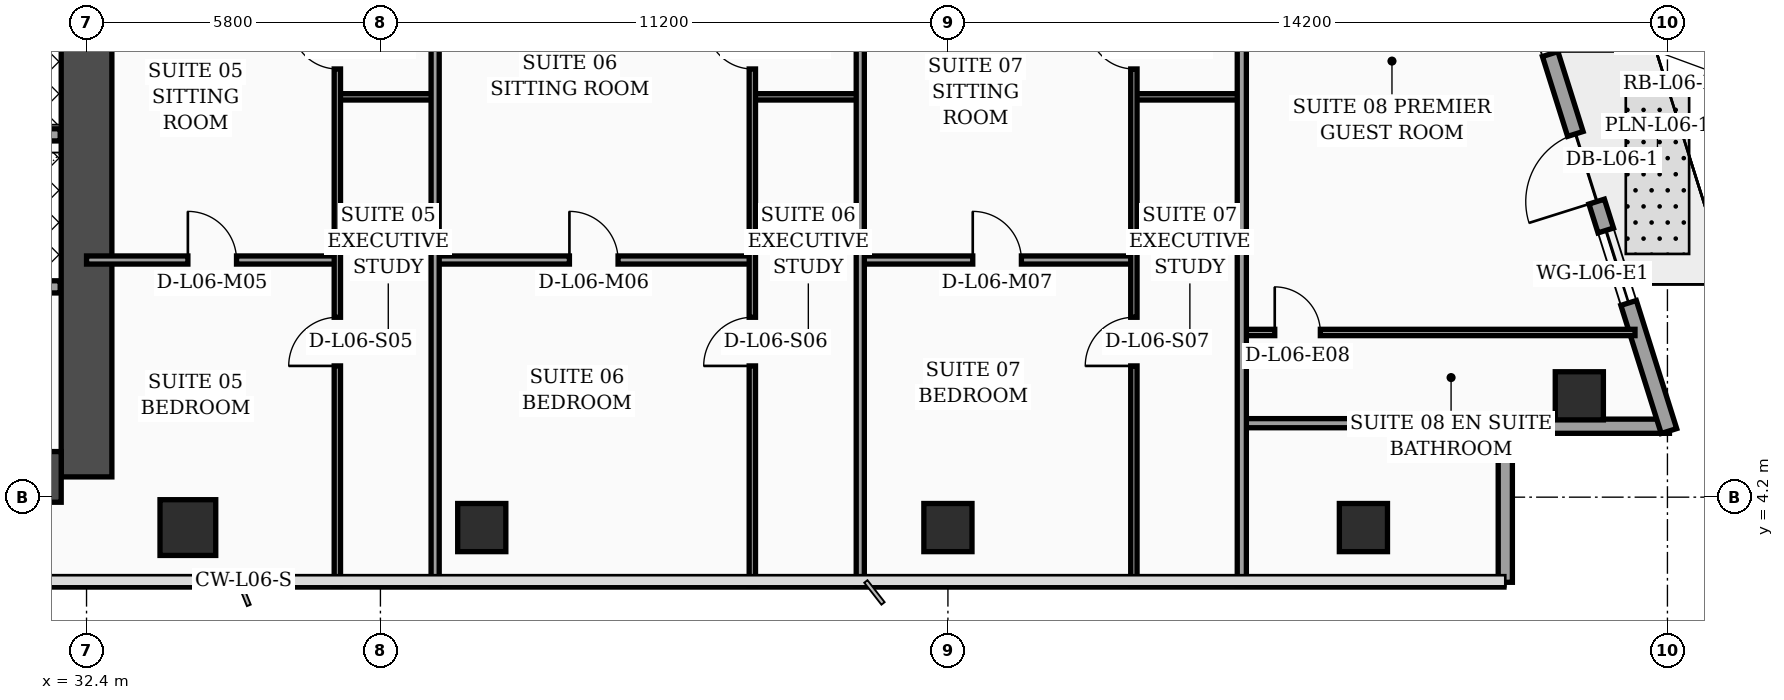
"""IFC4 building model, lengths in metres.
Left out: names, types, materials, properties, quantities, classifications, styles, units other than length and angle.
Written with IfcOpenShell. Run it as: python <this file> out.ifc"""

import sys

from ifc_helpers import new_model, si_unit, direction, frame, frame_2d, origin, origin_2d, place, context, subcontext, project, spatial, rectangle, hollow_rectangle, extrude, element, fill, save


model = new_model("IFC4")
c1 = context("Model", 3, precision=1e-05, world=origin(), true_north=direction((0.0, 1.0)))
c2 = subcontext(c1, "Body", "Model", "MODEL_VIEW")
j1 = project(units=[si_unit("LENGTHUNIT", "METRE"), si_unit("PLANEANGLEUNIT", "RADIAN")], contexts=[c1])
p1 = place(None, origin())
s1 = spatial("IfcSite", under=j1, at=p1, CompositionType="ELEMENT")
p2 = place(p1, origin())
s2 = spatial("IfcBuilding", under=s1, at=p2, CompositionType="ELEMENT")
p3 = place(p2, frame((0.0, 0.0, 30.8)))
s3 = spatial("IfcBuildingStorey", under=s2, at=p3, CompositionType="ELEMENT", Elevation=30.8)
p4 = place(p3, frame((32.4, 4.6, 0.0), z_axis=(0.0, 0.0, 1.0), x_axis=(0.0, 1.0, 0.0)))
e1 = element("IfcWall", 1, at=p4, inside=s3, PredefinedType="SHEAR", context=c2, shape_type="SweptSolid", body=[
    extrude(rectangle(XDim=10.4, YDim=1.0, at=frame_2d((5.2, 0.0))), origin(), (0.0, 0.0, 1.0), 3.56),
])
p5 = place(p3, frame((22.1, 4.6, 0.0), z_axis=(0.0, 0.0, 1.0), x_axis=(1.0, 0.0, 0.0)))
e2 = element("IfcWall", 2, at=p5, inside=s3, PredefinedType="SHEAR", context=c2, shape_type="SweptSolid", body=[
    extrude(rectangle(XDim=9.8, YDim=1.0, at=frame_2d((4.9, 0.0))), origin(), (0.0, 0.0, 1.0), 3.56),
])
p6 = place(p3, frame((34.4, 3.6, 0.0), z_axis=(0.0, 0.0, 1.0), x_axis=(1.0, 0.0, 0.0)))
e3 = element("IfcColumn", 3, at=p6, inside=s3, PredefinedType="COLUMN", context=c2, shape_type="SweptSolid", body=[
    extrude(hollow_rectangle(XDim=1.1, YDim=1.1, WallThickness=0.045, at=origin_2d()), origin(), (0.0, 0.0, 1.0), 3.56),
])
for number, where, z_axis, x_axis in (
    (4, (40.2, 3.6, 0.0), (0.0, 0.0, 1.0), (1.0, 0.0, 0.0)),
    (5, (49.4, 3.6, 0.0), (0.0, 0.0, 1.0), (1.0, 0.0, 0.0)),
    (6, (57.6, 3.6, 0.0), (0.0, 0.0, 1.0), (1.0, 0.0, 0.0)),
    (7, (61.861, 6.2, 0.0), (0.0, 0.0, 1.0), (1.0, 0.0, 0.0)),
):
    element("IfcColumn", number, at=place(p3, frame(where, z_axis=z_axis, x_axis=x_axis)), inside=s3, PredefinedType="COLUMN", context=c2, shape_type="SweptSolid", body=[
        extrude(hollow_rectangle(XDim=0.95, YDim=0.95, WallThickness=0.04, at=origin_2d()), origin(), (0.0, 0.0, 1.0), 3.56),
    ])
p7 = place(p3, frame((60.4, 2.52, 0.0), z_axis=(0.0, 0.0, 1.0), x_axis=(0.0, 1.0, 0.0)))
e8 = element("IfcWall", 8, at=p7, inside=s3, PredefinedType="SOLIDWALL", context=c2, shape_type="SweptSolid", body=[
    extrude(rectangle(XDim=2.94, YDim=0.28, at=frame_2d((1.47, 0.0))), origin(), (0.0, 0.0, 1.0), 3.04),
])
p8 = place(p3, frame((60.26, 5.6, 0.0), z_axis=(0.0, 0.0, 1.0), x_axis=(1.0, 0.0, 0.0)))
e9 = element("IfcWall", 9, at=p8, inside=s3, PredefinedType="SOLIDWALL", context=c2, shape_type="SweptSolid", body=[
    extrude(rectangle(XDim=3.38, YDim=0.28, at=frame_2d((1.69, 0.0))), origin(), (0.0, 0.0, 1.0), 3.04),
])
p9 = place(p3, frame((63.63, 5.505, 0.0), z_axis=(0.0, 0.0, 1.0), x_axis=(-0.300501856448, 0.953781229775, 0.0)))
e10 = element("IfcWall", 10, at=p9, inside=s3, PredefinedType="SOLIDWALL", context=c2, shape_type="SweptSolid", body=[
    extrude(rectangle(XDim=30.814, YDim=0.32, at=frame_2d((15.407, 0.0))), origin(), (0.0, 0.0, 1.0), 3.56),
])
p10 = place(p9, frame((4.747, 0.0, 0.0)))
e11 = element("IfcOpeningElement", 11, at=p10, cuts=e10, PredefinedType="OPENING", context=c2, shape_type="SweptSolid", body=[
    extrude(rectangle(XDim=1.4, YDim=2.25, at=frame_2d((0.7, 1.125))), frame((0.0, 0.17, 0.0), z_axis=(0.0, -1.0, 0.0), x_axis=(1.0, 0.0, 0.0)), (0.0, 0.0, 1.0), 0.34),
])
p11 = place(p9, frame((2.65, 0.0, 0.75)))
e12 = element("IfcOpeningElement", 12, at=p11, cuts=e10, PredefinedType="OPENING", context=c2, shape_type="SweptSolid", body=[
    extrude(rectangle(XDim=1.5, YDim=1.6, at=frame_2d((0.75, 0.8))), frame((0.0, 0.17, 0.0), z_axis=(0.0, -1.0, 0.0), x_axis=(1.0, 0.0, 0.0)), (0.0, 0.0, 1.0), 0.34),
])
p12 = place(p9, frame((7.8, 0.0, 0.75)))
e13 = element("IfcOpeningElement", 13, at=p12, cuts=e10, PredefinedType="OPENING", context=c2, shape_type="SweptSolid", body=[
    extrude(rectangle(XDim=1.5, YDim=1.6, at=frame_2d((0.75, 0.8))), frame((0.0, 0.17, 0.0), z_axis=(0.0, -1.0, 0.0), x_axis=(1.0, 0.0, 0.0)), (0.0, 0.0, 1.0), 0.34),
])
p13 = place(p9, frame((10.9, 0.0, 0.75)))
e14 = element("IfcOpeningElement", 14, at=p13, cuts=e10, PredefinedType="OPENING", context=c2, shape_type="SweptSolid", body=[
    extrude(rectangle(XDim=1.5, YDim=1.6, at=frame_2d((0.75, 0.8))), frame((0.0, 0.17, 0.0), z_axis=(0.0, -1.0, 0.0), x_axis=(1.0, 0.0, 0.0)), (0.0, 0.0, 1.0), 0.34),
])
p14 = place(p9, frame((14.0, 0.0, 0.75)))
e15 = element("IfcOpeningElement", 15, at=p14, cuts=e10, PredefinedType="OPENING", context=c2, shape_type="SweptSolid", body=[
    extrude(rectangle(XDim=1.5, YDim=1.6, at=frame_2d((0.75, 0.8))), frame((0.0, 0.17, 0.0), z_axis=(0.0, -1.0, 0.0), x_axis=(1.0, 0.0, 0.0)), (0.0, 0.0, 1.0), 0.34),
])
p15 = place(p9, frame((17.1, 0.0, 0.75)))
e16 = element("IfcOpeningElement", 16, at=p15, cuts=e10, PredefinedType="OPENING", context=c2, shape_type="SweptSolid", body=[
    extrude(rectangle(XDim=1.5, YDim=1.6, at=frame_2d((0.75, 0.8))), frame((0.0, 0.17, 0.0), z_axis=(0.0, -1.0, 0.0), x_axis=(1.0, 0.0, 0.0)), (0.0, 0.0, 1.0), 0.34),
])
p16 = place(p9, frame((20.2, 0.0, 0.75)))
e17 = element("IfcOpeningElement", 17, at=p16, cuts=e10, PredefinedType="OPENING", context=c2, shape_type="SweptSolid", body=[
    extrude(rectangle(XDim=1.5, YDim=1.6, at=frame_2d((0.75, 0.8))), frame((0.0, 0.17, 0.0), z_axis=(0.0, -1.0, 0.0), x_axis=(1.0, 0.0, 0.0)), (0.0, 0.0, 1.0), 0.34),
])
p17 = place(p9, frame((23.3, 0.0, 0.75)))
e18 = element("IfcOpeningElement", 18, at=p17, cuts=e10, PredefinedType="OPENING", context=c2, shape_type="SweptSolid", body=[
    extrude(rectangle(XDim=1.5, YDim=1.6, at=frame_2d((0.75, 0.8))), frame((0.0, 0.17, 0.0), z_axis=(0.0, -1.0, 0.0), x_axis=(1.0, 0.0, 0.0)), (0.0, 0.0, 1.0), 0.34),
])
p18 = place(p9, frame((26.4, 0.0, 0.75)))
e19 = element("IfcOpeningElement", 19, at=p18, cuts=e10, PredefinedType="OPENING", context=c2, shape_type="SweptSolid", body=[
    extrude(rectangle(XDim=1.5, YDim=1.6, at=frame_2d((0.75, 0.8))), frame((0.0, 0.17, 0.0), z_axis=(0.0, -1.0, 0.0), x_axis=(1.0, 0.0, 0.0)), (0.0, 0.0, 1.0), 0.34),
])
p19 = place(p3, frame((27.02, 11.35, 0.0), z_axis=(0.0, 0.0, 1.0), x_axis=(1.0, 0.0, 0.0)))
e20 = element("IfcWall", 20, at=p19, inside=s3, PredefinedType="SOLIDWALL", context=c2, shape_type="SweptSolid", body=[
    extrude(rectangle(XDim=4.86, YDim=0.24, at=frame_2d((2.43, 0.0))), origin(), (0.0, 0.0, 1.0), 3.56),
])
p20 = place(p19, frame((0.45, 0.0, 0.0)))
e21 = element("IfcOpeningElement", 21, at=p20, cuts=e20, PredefinedType="OPENING", context=c2, shape_type="SweptSolid", body=[
    extrude(rectangle(XDim=1.3, YDim=2.35, at=frame_2d((0.65, 1.175))), frame((0.0, 0.13, 0.0), z_axis=(0.0, -1.0, 0.0), x_axis=(1.0, 0.0, 0.0)), (0.0, 0.0, 1.0), 0.26),
])
p21 = place(p3, frame((27.02, 8.35, 0.0), z_axis=(0.0, 0.0, 1.0), x_axis=(1.0, 0.0, 0.0)))
e22 = element("IfcWall", 22, at=p21, inside=s3, PredefinedType="SOLIDWALL", context=c2, shape_type="SweptSolid", body=[
    extrude(rectangle(XDim=4.86, YDim=0.24, at=frame_2d((2.43, 0.0))), origin(), (0.0, 0.0, 1.0), 3.56),
])
p22 = place(p3, frame((37.35, 12.1, 0.0), z_axis=(0.0, 0.0, 1.0), x_axis=(1.0, 0.0, 0.0)))
e23 = element("IfcWall", 23, at=p22, inside=s3, PredefinedType="PARTITIONING", context=c2, shape_type="SweptSolid", body=[
    extrude(rectangle(XDim=1.93, YDim=0.125, at=frame_2d((0.965, 0.0))), origin(), (0.0, 0.0, 1.0), 3.56),
])
p23 = place(p3, frame((32.4, 8.88, 0.0), z_axis=(0.0, 0.0, 1.0), x_axis=(1.0, 0.0, 0.0)))
e24 = element("IfcWall", 24, at=p23, inside=s3, PredefinedType="PARTITIONING", context=c2, shape_type="SweptSolid", body=[
    extrude(rectangle(XDim=4.95, YDim=0.16, at=frame_2d((2.475, 0.0))), origin(), (0.0, 0.0, 1.0), 2.84),
])
p24 = place(p23, frame((2.0, 0.0, 0.0)))
e25 = element("IfcOpeningElement", 25, at=p24, cuts=e24, PredefinedType="OPENING", context=c2, shape_type="SweptSolid", body=[
    extrude(rectangle(XDim=0.96, YDim=2.2, at=frame_2d((0.48, 1.1))), frame((0.0, 0.09, 0.0), z_axis=(0.0, -1.0, 0.0), x_axis=(1.0, 0.0, 0.0)), (0.0, 0.0, 1.0), 0.18),
])
p25 = place(p3, frame((37.35, 2.44, 0.0), z_axis=(0.0, 0.0, 1.0), x_axis=(0.0, 1.0, 0.0)))
e26 = element("IfcWall", 26, at=p25, inside=s3, PredefinedType="PARTITIONING", context=c2, shape_type="SweptSolid", body=[
    extrude(rectangle(XDim=12.71, YDim=0.125, at=frame_2d((6.355, 0.0))), origin(), (0.0, 0.0, 1.0), 2.84),
])
p26 = place(p25, frame((4.35, 0.0, 0.0)))
e27 = element("IfcOpeningElement", 27, at=p26, cuts=e26, PredefinedType="OPENING", context=c2, shape_type="SweptSolid", body=[
    extrude(rectangle(XDim=0.96, YDim=2.2, at=frame_2d((0.48, 1.1))), frame((0.0, 0.073, 0.0), z_axis=(0.0, -1.0, 0.0), x_axis=(1.0, 0.0, 0.0)), (0.0, 0.0, 1.0), 0.145),
])
p27 = place(p25, frame((10.21, 0.0, 0.0)))
e28 = element("IfcOpeningElement", 28, at=p27, cuts=e26, PredefinedType="OPENING", context=c2, shape_type="SweptSolid", body=[
    extrude(rectangle(XDim=0.9, YDim=2.15, at=frame_2d((0.45, 1.075))), frame((0.0, 0.073, 0.0), z_axis=(0.0, -1.0, 0.0), x_axis=(1.0, 0.0, 0.0)), (0.0, 0.0, 1.0), 0.145),
])
p28 = place(p3, frame((45.54, 12.1, 0.0), z_axis=(0.0, 0.0, 1.0), x_axis=(1.0, 0.0, 0.0)))
e29 = element("IfcWall", 29, at=p28, inside=s3, PredefinedType="PARTITIONING", context=c2, shape_type="SweptSolid", body=[
    extrude(rectangle(XDim=2.13, YDim=0.125, at=frame_2d((1.065, 0.0))), origin(), (0.0, 0.0, 1.0), 2.84),
])
p29 = place(p3, frame((39.28, 8.88, 0.0), z_axis=(0.0, 0.0, 1.0), x_axis=(1.0, 0.0, 0.0)))
e30 = element("IfcWall", 30, at=p29, inside=s3, PredefinedType="PARTITIONING", context=c2, shape_type="SweptSolid", body=[
    extrude(rectangle(XDim=6.26, YDim=0.16, at=frame_2d((3.13, 0.0))), origin(), (0.0, 0.0, 1.0), 3.56),
])
p30 = place(p29, frame((2.65, 0.0, 0.0)))
e31 = element("IfcOpeningElement", 31, at=p30, cuts=e30, PredefinedType="OPENING", context=c2, shape_type="SweptSolid", body=[
    extrude(rectangle(XDim=0.96, YDim=2.2, at=frame_2d((0.48, 1.1))), frame((0.0, 0.09, 0.0), z_axis=(0.0, -1.0, 0.0), x_axis=(1.0, 0.0, 0.0)), (0.0, 0.0, 1.0), 0.18),
])
p31 = place(p3, frame((45.54, 2.44, 0.0), z_axis=(0.0, 0.0, 1.0), x_axis=(0.0, 1.0, 0.0)))
e32 = element("IfcWall", 32, at=p31, inside=s3, PredefinedType="PARTITIONING", context=c2, shape_type="SweptSolid", body=[
    extrude(rectangle(XDim=12.71, YDim=0.125, at=frame_2d((6.355, 0.0))), origin(), (0.0, 0.0, 1.0), 3.04),
])
p32 = place(p31, frame((4.35, 0.0, 0.0)))
e33 = element("IfcOpeningElement", 33, at=p32, cuts=e32, PredefinedType="OPENING", context=c2, shape_type="SweptSolid", body=[
    extrude(rectangle(XDim=0.96, YDim=2.2, at=frame_2d((0.48, 1.1))), frame((0.0, 0.073, 0.0), z_axis=(0.0, -1.0, 0.0), x_axis=(1.0, 0.0, 0.0)), (0.0, 0.0, 1.0), 0.145),
])
p33 = place(p31, frame((10.21, 0.0, 0.0)))
e34 = element("IfcOpeningElement", 34, at=p33, cuts=e32, PredefinedType="OPENING", context=c2, shape_type="SweptSolid", body=[
    extrude(rectangle(XDim=0.9, YDim=2.15, at=frame_2d((0.45, 1.075))), frame((0.0, 0.073, 0.0), z_axis=(0.0, -1.0, 0.0), x_axis=(1.0, 0.0, 0.0)), (0.0, 0.0, 1.0), 0.145),
])
p34 = place(p3, frame((39.28, 2.44, 0.0), z_axis=(0.0, 0.0, 1.0), x_axis=(0.0, 1.0, 0.0)))
e35 = element("IfcWall", 35, at=p34, inside=s3, PredefinedType="PARTITIONING", context=c2, shape_type="SweptSolid", body=[
    extrude(rectangle(XDim=12.71, YDim=0.16, at=frame_2d((6.355, 0.0))), origin(), (0.0, 0.0, 1.0), 2.84),
])
p35 = place(p3, frame((53.07, 12.1, 0.0), z_axis=(0.0, 0.0, 1.0), x_axis=(1.0, 0.0, 0.0)))
e36 = element("IfcWall", 36, at=p35, inside=s3, PredefinedType="PARTITIONING", context=c2, shape_type="SweptSolid", body=[
    extrude(rectangle(XDim=2.13, YDim=0.125, at=frame_2d((1.065, 0.0))), origin(), (0.0, 0.0, 1.0), 3.56),
])
p36 = place(p3, frame((47.67, 8.88, 0.0), z_axis=(0.0, 0.0, 1.0), x_axis=(1.0, 0.0, 0.0)))
e37 = element("IfcWall", 37, at=p36, inside=s3, PredefinedType="PARTITIONING", context=c2, shape_type="SweptSolid", body=[
    extrude(rectangle(XDim=5.4, YDim=0.16, at=frame_2d((2.7, 0.0))), origin(), (0.0, 0.0, 1.0), 2.84),
])
p37 = place(p36, frame((2.22, 0.0, 0.0)))
e38 = element("IfcOpeningElement", 38, at=p37, cuts=e37, PredefinedType="OPENING", context=c2, shape_type="SweptSolid", body=[
    extrude(rectangle(XDim=0.96, YDim=2.2, at=frame_2d((0.48, 1.1))), frame((0.0, 0.09, 0.0), z_axis=(0.0, -1.0, 0.0), x_axis=(1.0, 0.0, 0.0)), (0.0, 0.0, 1.0), 0.18),
])
p38 = place(p3, frame((53.07, 2.44, 0.0), z_axis=(0.0, 0.0, 1.0), x_axis=(0.0, 1.0, 0.0)))
e39 = element("IfcWall", 39, at=p38, inside=s3, PredefinedType="PARTITIONING", context=c2, shape_type="SweptSolid", body=[
    extrude(rectangle(XDim=12.71, YDim=0.125, at=frame_2d((6.355, 0.0))), origin(), (0.0, 0.0, 1.0), 3.04),
])
p39 = place(p38, frame((4.35, 0.0, 0.0)))
e40 = element("IfcOpeningElement", 40, at=p39, cuts=e39, PredefinedType="OPENING", context=c2, shape_type="SweptSolid", body=[
    extrude(rectangle(XDim=0.96, YDim=2.2, at=frame_2d((0.48, 1.1))), frame((0.0, 0.073, 0.0), z_axis=(0.0, -1.0, 0.0), x_axis=(1.0, 0.0, 0.0)), (0.0, 0.0, 1.0), 0.145),
])
p40 = place(p38, frame((10.21, 0.0, 0.0)))
e41 = element("IfcOpeningElement", 41, at=p40, cuts=e39, PredefinedType="OPENING", context=c2, shape_type="SweptSolid", body=[
    extrude(rectangle(XDim=0.9, YDim=2.15, at=frame_2d((0.45, 1.075))), frame((0.0, 0.073, 0.0), z_axis=(0.0, -1.0, 0.0), x_axis=(1.0, 0.0, 0.0)), (0.0, 0.0, 1.0), 0.145),
])
p41 = place(p3, frame((47.67, 2.44, 0.0), z_axis=(0.0, 0.0, 1.0), x_axis=(0.0, 1.0, 0.0)))
e42 = element("IfcWall", 42, at=p41, inside=s3, PredefinedType="PARTITIONING", context=c2, shape_type="SweptSolid", body=[
    extrude(rectangle(XDim=12.71, YDim=0.16, at=frame_2d((6.355, 0.0))), origin(), (0.0, 0.0, 1.0), 2.84),
])
p42 = place(p3, frame((55.2, 7.45, 0.0), z_axis=(0.0, 0.0, 1.0), x_axis=(1.0, 0.0, 0.0)))
e43 = element("IfcWall", 43, at=p42, inside=s3, PredefinedType="PARTITIONING", context=c2, shape_type="SweptSolid", body=[
    extrude(rectangle(XDim=7.76, YDim=0.125, at=frame_2d((3.88, 0.0))), origin(), (0.0, 0.0, 1.0), 3.04),
])
p43 = place(p42, frame((0.65, 0.0, 0.0)))
e44 = element("IfcOpeningElement", 44, at=p43, cuts=e43, PredefinedType="OPENING", context=c2, shape_type="SweptSolid", body=[
    extrude(rectangle(XDim=0.9, YDim=2.15, at=frame_2d((0.45, 1.075))), frame((0.0, 0.073, 0.0), z_axis=(0.0, -1.0, 0.0), x_axis=(1.0, 0.0, 0.0)), (0.0, 0.0, 1.0), 0.145),
])
p44 = place(p3, frame((55.2, 5.66, 0.0), z_axis=(0.0, 0.0, 1.0), x_axis=(1.0, 0.0, 0.0)))
e45 = element("IfcWall", 45, at=p44, inside=s3, PredefinedType="PARTITIONING", context=c2, shape_type="SweptSolid", body=[
    extrude(rectangle(XDim=5.2, YDim=0.18, at=frame_2d((2.6, 0.0))), origin(), (0.0, 0.0, 1.0), 3.04),
])
p45 = place(p3, frame((55.2, 2.44, 0.0), z_axis=(0.0, 0.0, 1.0), x_axis=(0.0, 1.0, 0.0)))
e46 = element("IfcWall", 46, at=p45, inside=s3, PredefinedType="PARTITIONING", context=c2, shape_type="SweptSolid", body=[
    extrude(rectangle(XDim=15.56, YDim=0.18, at=frame_2d((7.78, 0.0))), origin(), (0.0, 0.0, 1.0), 3.04),
])
p46 = place(p45, frame((13.33, 0.0, 0.0)))
e47 = element("IfcOpeningElement", 47, at=p46, cuts=e46, PredefinedType="OPENING", context=c2, shape_type="SweptSolid", body=[
    extrude(rectangle(XDim=1.02, YDim=2.2, at=frame_2d((0.51, 1.1))), frame((0.0, 0.1, 0.0), z_axis=(0.0, -1.0, 0.0), x_axis=(1.0, 0.0, 0.0)), (0.0, 0.0, 1.0), 0.2),
])
p47 = place(p10, origin())
e48 = element("IfcDoor", 48, at=p47, inside=s3, OperationType="SINGLE_SWING_LEFT", PredefinedType="DOOR", context=c2, shape_type="SweptSolid", body=[
    extrude(rectangle(XDim=1.4, YDim=2.25, at=frame_2d((0.7, 1.125))), frame((0.0, 0.025, 0.0), z_axis=(0.0, -1.0, 0.0), x_axis=(1.0, 0.0, 0.0)), (0.0, 0.0, 1.0), 0.05),
])
fill(e11, e48)
p48 = place(p11, origin())
e49 = element("IfcWindow", 49, at=p48, inside=s3, PartitioningType="SINGLE_PANEL", PredefinedType="WINDOW", context=c2, shape_type="SweptSolid", body=[
    extrude(rectangle(XDim=1.5, YDim=1.6, at=frame_2d((0.75, 0.8))), frame((0.0, 0.03, 0.0), z_axis=(0.0, -1.0, 0.0), x_axis=(1.0, 0.0, 0.0)), (0.0, 0.0, 1.0), 0.06),
])
fill(e12, e49)
p49 = place(p12, origin())
e50 = element("IfcWindow", 50, at=p49, inside=s3, PartitioningType="SINGLE_PANEL", PredefinedType="WINDOW", context=c2, shape_type="SweptSolid", body=[
    extrude(rectangle(XDim=1.5, YDim=1.6, at=frame_2d((0.75, 0.8))), frame((0.0, 0.03, 0.0), z_axis=(0.0, -1.0, 0.0), x_axis=(1.0, 0.0, 0.0)), (0.0, 0.0, 1.0), 0.06),
])
fill(e13, e50)
p50 = place(p24, origin())
e51 = element("IfcDoor", 51, at=p50, inside=s3, OperationType="SINGLE_SWING_LEFT", PredefinedType="DOOR", context=c2, shape_type="SweptSolid", body=[
    extrude(rectangle(XDim=0.96, YDim=2.2, at=frame_2d((0.48, 1.1))), frame((0.0, 0.025, 0.0), z_axis=(0.0, -1.0, 0.0), x_axis=(1.0, 0.0, 0.0)), (0.0, 0.0, 1.0), 0.05),
])
fill(e25, e51)
p51 = place(p26, origin())
e52 = element("IfcDoor", 52, at=p51, inside=s3, OperationType="SINGLE_SWING_LEFT", PredefinedType="DOOR", context=c2, shape_type="SweptSolid", body=[
    extrude(rectangle(XDim=0.96, YDim=2.2, at=frame_2d((0.48, 1.1))), frame((0.0, 0.025, 0.0), z_axis=(0.0, -1.0, 0.0), x_axis=(1.0, 0.0, 0.0)), (0.0, 0.0, 1.0), 0.05),
])
fill(e27, e52)
p52 = place(p27, origin())
e53 = element("IfcDoor", 53, at=p52, inside=s3, OperationType="SINGLE_SWING_RIGHT", PredefinedType="DOOR", context=c2, shape_type="SweptSolid", body=[
    extrude(rectangle(XDim=0.9, YDim=2.15, at=frame_2d((0.45, 1.075))), frame((0.0, 0.025, 0.0), z_axis=(0.0, -1.0, 0.0), x_axis=(1.0, 0.0, 0.0)), (0.0, 0.0, 1.0), 0.05),
])
fill(e28, e53)
p53 = place(p30, origin())
e54 = element("IfcDoor", 54, at=p53, inside=s3, OperationType="SINGLE_SWING_LEFT", PredefinedType="DOOR", context=c2, shape_type="SweptSolid", body=[
    extrude(rectangle(XDim=0.96, YDim=2.2, at=frame_2d((0.48, 1.1))), frame((0.0, 0.025, 0.0), z_axis=(0.0, -1.0, 0.0), x_axis=(1.0, 0.0, 0.0)), (0.0, 0.0, 1.0), 0.05),
])
fill(e31, e54)
p54 = place(p32, origin())
e55 = element("IfcDoor", 55, at=p54, inside=s3, OperationType="SINGLE_SWING_LEFT", PredefinedType="DOOR", context=c2, shape_type="SweptSolid", body=[
    extrude(rectangle(XDim=0.96, YDim=2.2, at=frame_2d((0.48, 1.1))), frame((0.0, 0.025, 0.0), z_axis=(0.0, -1.0, 0.0), x_axis=(1.0, 0.0, 0.0)), (0.0, 0.0, 1.0), 0.05),
])
fill(e33, e55)
p55 = place(p33, origin())
e56 = element("IfcDoor", 56, at=p55, inside=s3, OperationType="SINGLE_SWING_RIGHT", PredefinedType="DOOR", context=c2, shape_type="SweptSolid", body=[
    extrude(rectangle(XDim=0.9, YDim=2.15, at=frame_2d((0.45, 1.075))), frame((0.0, 0.025, 0.0), z_axis=(0.0, -1.0, 0.0), x_axis=(1.0, 0.0, 0.0)), (0.0, 0.0, 1.0), 0.05),
])
fill(e34, e56)
p56 = place(p37, origin())
e57 = element("IfcDoor", 57, at=p56, inside=s3, OperationType="SINGLE_SWING_LEFT", PredefinedType="DOOR", context=c2, shape_type="SweptSolid", body=[
    extrude(rectangle(XDim=0.96, YDim=2.2, at=frame_2d((0.48, 1.1))), frame((0.0, 0.025, 0.0), z_axis=(0.0, -1.0, 0.0), x_axis=(1.0, 0.0, 0.0)), (0.0, 0.0, 1.0), 0.05),
])
fill(e38, e57)
p57 = place(p39, origin())
e58 = element("IfcDoor", 58, at=p57, inside=s3, OperationType="SINGLE_SWING_LEFT", PredefinedType="DOOR", context=c2, shape_type="SweptSolid", body=[
    extrude(rectangle(XDim=0.96, YDim=2.2, at=frame_2d((0.48, 1.1))), frame((0.0, 0.025, 0.0), z_axis=(0.0, -1.0, 0.0), x_axis=(1.0, 0.0, 0.0)), (0.0, 0.0, 1.0), 0.05),
])
fill(e40, e58)
p58 = place(p40, origin())
e59 = element("IfcDoor", 59, at=p58, inside=s3, OperationType="SINGLE_SWING_RIGHT", PredefinedType="DOOR", context=c2, shape_type="SweptSolid", body=[
    extrude(rectangle(XDim=0.9, YDim=2.15, at=frame_2d((0.45, 1.075))), frame((0.0, 0.025, 0.0), z_axis=(0.0, -1.0, 0.0), x_axis=(1.0, 0.0, 0.0)), (0.0, 0.0, 1.0), 0.05),
])
fill(e41, e59)
p59 = place(p43, origin())
e60 = element("IfcDoor", 60, at=p59, inside=s3, OperationType="SINGLE_SWING_LEFT", PredefinedType="DOOR", context=c2, shape_type="SweptSolid", body=[
    extrude(rectangle(XDim=0.9, YDim=2.15, at=frame_2d((0.45, 1.075))), frame((0.0, 0.025, 0.0), z_axis=(0.0, -1.0, 0.0), x_axis=(1.0, 0.0, 0.0)), (0.0, 0.0, 1.0), 0.05),
])
fill(e44, e60)
save(model, sys.argv[1])
